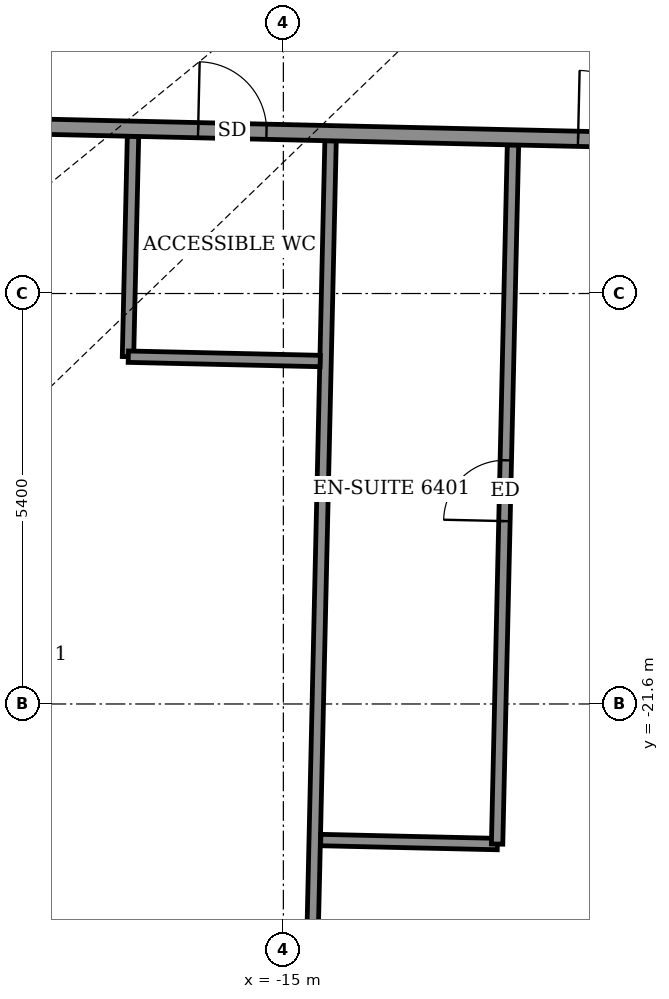
"""IFC4 building model, lengths in metres.
Left out: names, types, materials, properties, quantities, classifications, styles, units other than length and angle.
Written with IfcOpenShell. Run it as: python <this file> out.ifc"""

import sys

from ifc_helpers import new_model, si_unit, direction, frame, frame_2d, origin, place, context, subcontext, project, spatial, rectangle, extrude, element, fill, save


model = new_model("IFC4")
c1 = context("Model", 3, precision=1e-05, world=origin(), true_north=direction((0.0, 1.0)))
c2 = subcontext(c1, "Body", "Model", "MODEL_VIEW")
j1 = project(units=[si_unit("LENGTHUNIT", "METRE"), si_unit("PLANEANGLEUNIT", "RADIAN")], contexts=[c1])
p1 = place(None, origin())
s1 = spatial("IfcSite", under=j1, at=p1, CompositionType="ELEMENT")
p2 = place(p1, origin())
s2 = spatial("IfcBuilding", under=s1, at=p2, CompositionType="ELEMENT")
p3 = place(p2, frame((0.0, 0.0, 252.7)))
s3 = spatial("IfcBuildingStorey", under=s2, at=p3, CompositionType="ELEMENT", Elevation=252.7)
p4 = place(p3, frame((-14.66, -26.588, 0.0), z_axis=(0.0, 0.0, 1.0), x_axis=(0.022661475803, 0.999743195783, 0.0)))
e1 = element("IfcWall", 1, at=p4, inside=s3, PredefinedType="PARTITIONING", context=c2, shape_type="SweptSolid", body=[
    extrude(rectangle(XDim=12.4, YDim=0.15, at=frame_2d((6.2, 0.0))), origin(), (0.0, 0.0, 1.0), 2.45),
])
p5 = place(p3, frame((-14.508, -23.39, 0.0), z_axis=(0.0, 0.0, 1.0), x_axis=(0.999737862264, -0.022895561926, 0.0)))
e2 = element("IfcWall", 2, at=p5, inside=s3, PredefinedType="PARTITIONING", context=c2, shape_type="SweptSolid", body=[
    extrude(rectangle(XDim=2.324, YDim=0.15, at=frame_2d((1.162, 0.0))), origin(), (0.0, 0.0, 1.0), 4.05),
])
p6 = place(p3, frame((-12.188, -23.443, 0.0), z_axis=(0.0, 0.0, 1.0), x_axis=(0.02271477479, 0.999741986218, 0.0)))
e3 = element("IfcWall", 3, at=p6, inside=s3, PredefinedType="PARTITIONING", context=c2, shape_type="SweptSolid", body=[
    extrude(rectangle(XDim=9.2, YDim=0.15, at=frame_2d((4.6, 0.0))), origin(), (0.0, 0.0, 1.0), 4.05),
])
p7 = place(p6, frame((4.25, 0.0, 0.0)))
e4 = element("IfcOpeningElement", 4, at=p7, cuts=e3, PredefinedType="OPENING", context=c2, shape_type="SweptSolid", body=[
    extrude(rectangle(XDim=0.8, YDim=2.1, at=frame_2d((0.4, 1.05))), frame((0.0, 0.085, 0.0), z_axis=(0.0, -1.0, 0.0), x_axis=(1.0, 0.0, 0.0)), (0.0, 0.0, 1.0), 0.17),
])
p8 = place(p3, frame((-17.044, -17.031, 0.0), z_axis=(0.0, 0.0, 1.0), x_axis=(0.022732880677, 0.999741574676, 0.0)))
e5 = element("IfcWall", 5, at=p8, inside=s3, PredefinedType="PARTITIONING", context=c2, shape_type="SweptSolid", body=[
    extrude(rectangle(XDim=2.9, YDim=0.15, at=frame_2d((1.45, 0.0))), origin(), (0.0, 0.0, 1.0), 2.45),
])
p9 = place(p3, frame((-17.04, -17.031, 0.0), z_axis=(0.0, 0.0, 1.0), x_axis=(0.999746356616, -0.022521599255, 0.0)))
e6 = element("IfcWall", 6, at=p9, inside=s3, PredefinedType="PARTITIONING", context=c2, shape_type="SweptSolid", body=[
    extrude(rectangle(XDim=2.526, YDim=0.15, at=frame_2d((1.263, 0.0))), origin(), (0.0, 0.0, 1.0), 2.45),
])
p10 = place(p3, frame((-25.619, -13.836, 0.0), z_axis=(0.0, 0.0, 1.0), x_axis=(0.999742808343, -0.022678561832, 0.0)))
e7 = element("IfcWall", 7, at=p10, inside=s3, PredefinedType="PARTITIONING", context=c2, shape_type="SweptSolid", body=[
    extrude(rectangle(XDim=48.282, YDim=0.2, at=frame_2d((24.141, 0.0))), origin(), (0.0, 0.0, 1.0), 2.45),
])
p11 = place(p10, frame((3.125, 0.0, 0.0)))
e8 = element("IfcOpeningElement", 8, at=p11, cuts=e7, PredefinedType="OPENING", context=c2, shape_type="SweptSolid", body=[
    extrude(rectangle(XDim=1.0, YDim=2.1, at=frame_2d((0.5, 1.05))), frame((0.0, 0.11, 0.0), z_axis=(0.0, -1.0, 0.0), x_axis=(1.0, 0.0, 0.0)), (0.0, 0.0, 1.0), 0.22),
])
p12 = place(p10, frame((9.5, 0.0, 0.0)))
e9 = element("IfcOpeningElement", 9, at=p12, cuts=e7, PredefinedType="OPENING", context=c2, shape_type="SweptSolid", body=[
    extrude(rectangle(XDim=0.9, YDim=2.1, at=frame_2d((0.45, 1.05))), frame((0.0, 0.11, 0.0), z_axis=(0.0, -1.0, 0.0), x_axis=(1.0, 0.0, 0.0)), (0.0, 0.0, 1.0), 0.22),
])
p13 = place(p10, frame((14.5, 0.0, 0.0)))
e10 = element("IfcOpeningElement", 10, at=p13, cuts=e7, PredefinedType="OPENING", context=c2, shape_type="SweptSolid", body=[
    extrude(rectangle(XDim=0.9, YDim=2.1, at=frame_2d((0.45, 1.05))), frame((0.0, 0.11, 0.0), z_axis=(0.0, -1.0, 0.0), x_axis=(1.0, 0.0, 0.0)), (0.0, 0.0, 1.0), 0.22),
])
p14 = place(p10, frame((17.1, 0.0, 0.0)))
e11 = element("IfcOpeningElement", 11, at=p14, cuts=e7, PredefinedType="OPENING", context=c2, shape_type="SweptSolid", body=[
    extrude(rectangle(XDim=0.9, YDim=2.1, at=frame_2d((0.45, 1.05))), frame((0.0, 0.11, 0.0), z_axis=(0.0, -1.0, 0.0), x_axis=(1.0, 0.0, 0.0)), (0.0, 0.0, 1.0), 0.22),
])
p15 = place(p10, frame((24.5, 0.0, 0.0)))
e12 = element("IfcOpeningElement", 12, at=p15, cuts=e7, PredefinedType="OPENING", context=c2, shape_type="SweptSolid", body=[
    extrude(rectangle(XDim=0.9, YDim=2.1, at=frame_2d((0.45, 1.05))), frame((0.0, 0.11, 0.0), z_axis=(0.0, -1.0, 0.0), x_axis=(1.0, 0.0, 0.0)), (0.0, 0.0, 1.0), 0.22),
])
p16 = place(p10, frame((27.1, 0.0, 0.0)))
e13 = element("IfcOpeningElement", 13, at=p16, cuts=e7, PredefinedType="OPENING", context=c2, shape_type="SweptSolid", body=[
    extrude(rectangle(XDim=0.9, YDim=2.1, at=frame_2d((0.45, 1.05))), frame((0.0, 0.11, 0.0), z_axis=(0.0, -1.0, 0.0), x_axis=(1.0, 0.0, 0.0)), (0.0, 0.0, 1.0), 0.22),
])
p17 = place(p10, frame((35.825, 0.0, 0.0)))
e14 = element("IfcOpeningElement", 14, at=p17, cuts=e7, PredefinedType="OPENING", context=c2, shape_type="SweptSolid", body=[
    extrude(rectangle(XDim=1.0, YDim=2.1, at=frame_2d((0.5, 1.05))), frame((0.0, 0.11, 0.0), z_axis=(0.0, -1.0, 0.0), x_axis=(1.0, 0.0, 0.0)), (0.0, 0.0, 1.0), 0.22),
])
p18 = place(p10, frame((32.1, 0.0, 0.0)))
e15 = element("IfcOpeningElement", 15, at=p18, cuts=e7, PredefinedType="OPENING", context=c2, shape_type="SweptSolid", body=[
    extrude(rectangle(XDim=0.9, YDim=2.1, at=frame_2d((0.45, 1.05))), frame((0.0, 0.11, 0.0), z_axis=(0.0, -1.0, 0.0), x_axis=(1.0, 0.0, 0.0)), (0.0, 0.0, 1.0), 0.22),
])
p19 = place(p10, frame((39.825, 0.0, 0.0)))
e16 = element("IfcOpeningElement", 16, at=p19, cuts=e7, PredefinedType="OPENING", context=c2, shape_type="SweptSolid", body=[
    extrude(rectangle(XDim=1.0, YDim=2.1, at=frame_2d((0.5, 1.05))), frame((0.0, 0.11, 0.0), z_axis=(0.0, -1.0, 0.0), x_axis=(1.0, 0.0, 0.0)), (0.0, 0.0, 1.0), 0.22),
])
p20 = place(p10, frame((47.083, 0.0, 0.0)))
e17 = element("IfcOpeningElement", 17, at=p20, cuts=e7, PredefinedType="OPENING", context=c2, shape_type="SweptSolid", body=[
    extrude(rectangle(XDim=1.0, YDim=2.1, at=frame_2d((0.5, 1.05))), frame((0.0, 0.11, 0.0), z_axis=(0.0, -1.0, 0.0), x_axis=(1.0, 0.0, 0.0)), (0.0, 0.0, 1.0), 0.22),
])
p21 = place(p12, origin())
e18 = element("IfcDoor", 18, at=p21, inside=s3, OperationType="SINGLE_SWING_LEFT", PredefinedType="DOOR", context=c2, shape_type="SweptSolid", body=[
    extrude(rectangle(XDim=0.9, YDim=2.1, at=frame_2d((0.45, 1.05))), frame((0.0, 0.025, 0.0), z_axis=(0.0, -1.0, 0.0), x_axis=(1.0, 0.0, 0.0)), (0.0, 0.0, 1.0), 0.05),
])
fill(e9, e18)
p22 = place(p13, origin())
e19 = element("IfcDoor", 19, at=p22, inside=s3, OperationType="SINGLE_SWING_LEFT", PredefinedType="DOOR", context=c2, shape_type="SweptSolid", body=[
    extrude(rectangle(XDim=0.9, YDim=2.1, at=frame_2d((0.45, 1.05))), frame((0.0, 0.025, 0.0), z_axis=(0.0, -1.0, 0.0), x_axis=(1.0, 0.0, 0.0)), (0.0, 0.0, 1.0), 0.05),
])
fill(e10, e19)
p23 = place(p7, origin())
e20 = element("IfcDoor", 20, at=p23, inside=s3, OperationType="SINGLE_SWING_LEFT", PredefinedType="DOOR", context=c2, shape_type="SweptSolid", body=[
    extrude(rectangle(XDim=0.8, YDim=2.1, at=frame_2d((0.4, 1.05))), frame((0.0, 0.025, 0.0), z_axis=(0.0, -1.0, 0.0), x_axis=(1.0, 0.0, 0.0)), (0.0, 0.0, 1.0), 0.05),
])
fill(e4, e20)
save(model, sys.argv[1])
